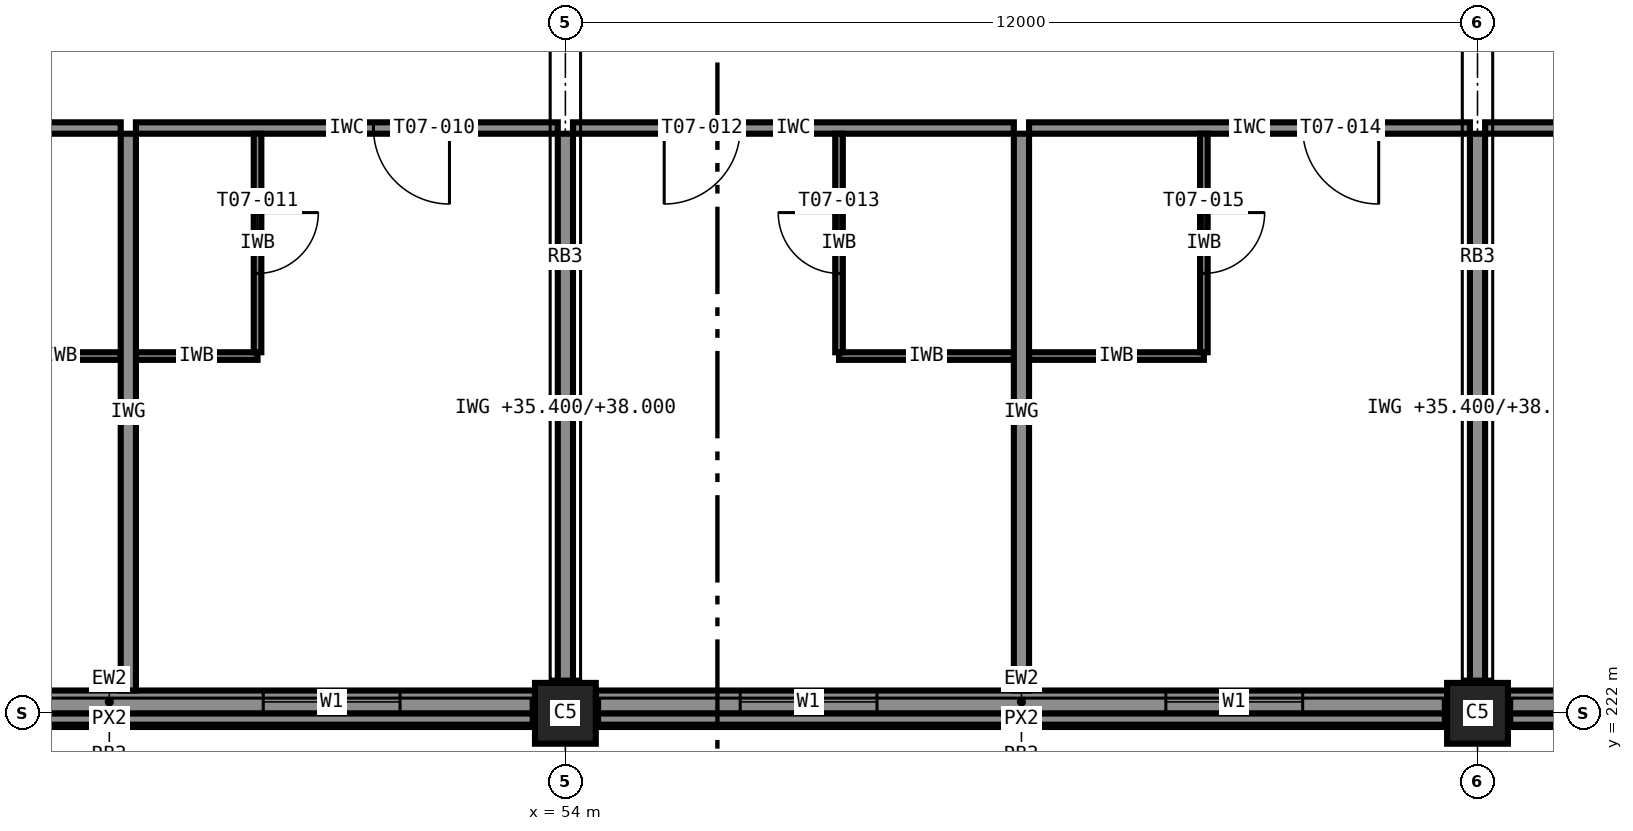
"""IFC4 building model, lengths in metres.
Left out: names, types, materials, properties, quantities, classifications, styles, units other than length and angle.
Written with IfcOpenShell. Run it as: python <this file> out.ifc"""

import sys

from ifc_helpers import new_model, si_unit, direction, frame, frame_2d, origin, origin_2d, place, context, subcontext, project, spatial, rectangle, extrude, element, fill, save


model = new_model("IFC4")
c1 = context("Model", 3, precision=1e-05, world=origin(), true_north=direction((0.0, 1.0)))
c2 = subcontext(c1, "Body", "Model", "MODEL_VIEW")
j1 = project(units=[si_unit("LENGTHUNIT", "METRE"), si_unit("PLANEANGLEUNIT", "RADIAN")], contexts=[c1])
p1 = place(None, origin())
s1 = spatial("IfcSite", under=j1, at=p1, CompositionType="ELEMENT")
p2 = place(p1, origin())
s2 = spatial("IfcBuilding", under=s1, at=p2, CompositionType="ELEMENT")
p3 = place(p2, frame((0.0, 0.0, 35.4)))
s3 = spatial("IfcBuildingStorey", under=s2, at=p3, CompositionType="ELEMENT", Elevation=35.4)
for number, where, z_axis, x_axis in (
    (1, (54.0, 222.0, 0.0), (0.0, 0.0, 1.0), (1.0, 0.0, 0.0)),
    (2, (66.0, 222.0, 0.0), (0.0, 0.0, 1.0), (1.0, 0.0, 0.0)),
):
    element("IfcColumn", number, at=place(p3, frame(where, z_axis=z_axis, x_axis=x_axis)), inside=s3, PredefinedType="COLUMN", context=c2, shape_type="SweptSolid", body=[
        extrude(rectangle(XDim=0.8, YDim=0.8, at=origin_2d()), origin(), (0.0, 0.0, 1.0), 3.6),
    ])
p4 = place(p3, frame((42.4, 222.15, 0.0), z_axis=(0.0, 0.0, 1.0), x_axis=(1.0, 0.0, 0.0)))
e3 = element("IfcWall", 3, at=p4, inside=s3, PredefinedType="STANDARD", context=c2, shape_type="SweptSolid", body=[
    extrude(rectangle(XDim=11.2, YDim=0.3, at=frame_2d((5.6, 0.0))), origin(), (0.0, 0.0, 1.0), 2.6),
])
p5 = place(p4, frame((2.075, 0.0, 0.85)))
e4 = element("IfcOpeningElement", 4, at=p5, cuts=e3, PredefinedType="OPENING", context=c2, shape_type="SweptSolid", body=[
    extrude(rectangle(XDim=1.8, YDim=1.75, at=frame_2d((0.9, 0.875))), frame((0.0, 0.16, 0.0), z_axis=(0.0, -1.0, 0.0), x_axis=(1.0, 0.0, 0.0)), (0.0, 0.0, 1.0), 0.32),
])
p6 = place(p4, frame((7.625, 0.0, 0.85)))
e5 = element("IfcOpeningElement", 5, at=p6, cuts=e3, PredefinedType="OPENING", context=c2, shape_type="SweptSolid", body=[
    extrude(rectangle(XDim=1.8, YDim=1.75, at=frame_2d((0.9, 0.875))), frame((0.0, 0.16, 0.0), z_axis=(0.0, -1.0, 0.0), x_axis=(1.0, 0.0, 0.0)), (0.0, 0.0, 1.0), 0.32),
])
p7 = place(p3, frame((54.4, 222.15, 0.0), z_axis=(0.0, 0.0, 1.0), x_axis=(1.0, 0.0, 0.0)))
e6 = element("IfcWall", 6, at=p7, inside=s3, PredefinedType="STANDARD", context=c2, shape_type="SweptSolid", body=[
    extrude(rectangle(XDim=11.2, YDim=0.3, at=frame_2d((5.6, 0.0))), origin(), (0.0, 0.0, 1.0), 2.6),
])
p8 = place(p7, frame((1.9, 0.0, 0.85)))
e7 = element("IfcOpeningElement", 7, at=p8, cuts=e6, PredefinedType="OPENING", context=c2, shape_type="SweptSolid", body=[
    extrude(rectangle(XDim=1.8, YDim=1.75, at=frame_2d((0.9, 0.875))), frame((0.0, 0.16, 0.0), z_axis=(0.0, -1.0, 0.0), x_axis=(1.0, 0.0, 0.0)), (0.0, 0.0, 1.0), 0.32),
])
p9 = place(p7, frame((7.5, 0.0, 0.85)))
e8 = element("IfcOpeningElement", 8, at=p9, cuts=e6, PredefinedType="OPENING", context=c2, shape_type="SweptSolid", body=[
    extrude(rectangle(XDim=1.8, YDim=1.75, at=frame_2d((0.9, 0.875))), frame((0.0, 0.16, 0.0), z_axis=(0.0, -1.0, 0.0), x_axis=(1.0, 0.0, 0.0)), (0.0, 0.0, 1.0), 0.32),
])
p10 = place(p3, frame((66.4, 222.15, 0.0), z_axis=(0.0, 0.0, 1.0), x_axis=(1.0, 0.0, 0.0)))
e9 = element("IfcWall", 9, at=p10, inside=s3, PredefinedType="STANDARD", context=c2, shape_type="SweptSolid", body=[
    extrude(rectangle(XDim=11.2, YDim=0.3, at=frame_2d((5.6, 0.0))), origin(), (0.0, 0.0, 1.0), 2.6),
])
p11 = place(p10, frame((0.967, 0.0, 0.85)))
e10 = element("IfcOpeningElement", 10, at=p11, cuts=e9, PredefinedType="OPENING", context=c2, shape_type="SweptSolid", body=[
    extrude(rectangle(XDim=1.8, YDim=1.75, at=frame_2d((0.9, 0.875))), frame((0.0, 0.16, 0.0), z_axis=(0.0, -1.0, 0.0), x_axis=(1.0, 0.0, 0.0)), (0.0, 0.0, 1.0), 0.32),
])
p12 = place(p10, frame((4.7, 0.0, 0.85)))
e11 = element("IfcOpeningElement", 11, at=p12, cuts=e9, PredefinedType="OPENING", context=c2, shape_type="SweptSolid", body=[
    extrude(rectangle(XDim=1.8, YDim=1.75, at=frame_2d((0.9, 0.875))), frame((0.0, 0.16, 0.0), z_axis=(0.0, -1.0, 0.0), x_axis=(1.0, 0.0, 0.0)), (0.0, 0.0, 1.0), 0.32),
])
p13 = place(p10, frame((8.433, 0.0, 0.85)))
e12 = element("IfcOpeningElement", 12, at=p13, cuts=e9, PredefinedType="OPENING", context=c2, shape_type="SweptSolid", body=[
    extrude(rectangle(XDim=1.8, YDim=1.75, at=frame_2d((0.9, 0.875))), frame((0.0, 0.16, 0.0), z_axis=(0.0, -1.0, 0.0), x_axis=(1.0, 0.0, 0.0)), (0.0, 0.0, 1.0), 0.32),
])
for number, where, z_axis, x_axis in (
    (13, (42.4, 221.925, 3.4), (0.0, 0.0, 1.0), (1.0, 0.0, 0.0)),
    (14, (54.4, 221.925, 3.4), (0.0, 0.0, 1.0), (1.0, 0.0, 0.0)),
    (15, (66.4, 221.925, 3.4), (0.0, 0.0, 1.0), (1.0, 0.0, 0.0)),
):
    element("IfcWall", number, at=place(p3, frame(where, z_axis=z_axis, x_axis=x_axis)), inside=s3, PredefinedType="STANDARD", context=c2, shape_type="SweptSolid", body=[
        extrude(rectangle(XDim=11.2, YDim=0.15, at=frame_2d((5.6, 0.0))), origin(), (0.0, 0.0, 1.0), 0.2),
    ])
p14 = place(p3, frame((48.15, 229.7, 0.0), z_axis=(0.0, 0.0, 1.0), x_axis=(-1.0, 0.0, 0.0)))
e16 = element("IfcWall", 16, at=p14, inside=s3, PredefinedType="PARTITIONING", context=c2, shape_type="SweptSolid", body=[
    extrude(rectangle(XDim=5.95, YDim=0.15, at=frame_2d((2.975, 0.0))), origin(), (0.0, 0.0, 1.0), 3.4),
])
p15 = place(p14, frame((3.125, 0.0, 0.0)))
e17 = element("IfcOpeningElement", 17, at=p15, cuts=e16, PredefinedType="OPENING", context=c2, shape_type="SweptSolid", body=[
    extrude(rectangle(XDim=1.0, YDim=2.1, at=frame_2d((0.5, 1.05))), frame((0.0, 0.085, 0.0), z_axis=(0.0, -1.0, 0.0), x_axis=(1.0, 0.0, 0.0)), (0.0, 0.0, 1.0), 0.17),
])
p16 = place(p3, frame((46.55, 226.7, 0.0), z_axis=(0.0, 0.0, 1.0), x_axis=(1.0, 0.0, 0.0)))
e18 = element("IfcWall", 18, at=p16, inside=s3, PredefinedType="PARTITIONING", context=c2, shape_type="SweptSolid", body=[
    extrude(rectangle(XDim=1.6, YDim=0.1, at=frame_2d((0.8, 0.0))), origin(), (0.0, 0.0, 1.0), 3.4),
])
p17 = place(p3, frame((53.9, 229.7, 0.0), z_axis=(0.0, 0.0, 1.0), x_axis=(-1.0, 0.0, 0.0)))
e19 = element("IfcWall", 19, at=p17, inside=s3, PredefinedType="PARTITIONING", context=c2, shape_type="SweptSolid", body=[
    extrude(rectangle(XDim=5.55, YDim=0.15, at=frame_2d((2.775, 0.0))), origin(), (0.0, 0.0, 1.0), 3.4),
])
p18 = place(p17, frame((1.425, 0.0, 0.0)))
e20 = element("IfcOpeningElement", 20, at=p18, cuts=e19, PredefinedType="OPENING", context=c2, shape_type="SweptSolid", body=[
    extrude(rectangle(XDim=1.0, YDim=2.1, at=frame_2d((0.5, 1.05))), frame((0.0, 0.085, 0.0), z_axis=(0.0, -1.0, 0.0), x_axis=(1.0, 0.0, 0.0)), (0.0, 0.0, 1.0), 0.17),
])
p19 = place(p3, frame((48.35, 226.7, 0.0), z_axis=(0.0, 0.0, 1.0), x_axis=(1.0, 0.0, 0.0)))
e21 = element("IfcWall", 21, at=p19, inside=s3, PredefinedType="PARTITIONING", context=c2, shape_type="SweptSolid", body=[
    extrude(rectangle(XDim=1.6, YDim=0.1, at=frame_2d((0.8, 0.0))), origin(), (0.0, 0.0, 1.0), 3.4),
])
p20 = place(p3, frame((49.95, 229.625, 0.0), z_axis=(0.0, 0.0, 1.0), x_axis=(0.0, -1.0, 0.0)))
e22 = element("IfcWall", 22, at=p20, inside=s3, PredefinedType="PARTITIONING", context=c2, shape_type="SweptSolid", body=[
    extrude(rectangle(XDim=2.875, YDim=0.1, at=frame_2d((1.438, 0.0))), origin(), (0.0, 0.0, 1.0), 3.4),
])
p21 = place(p20, frame((1.038, 0.0, 0.0)))
e23 = element("IfcOpeningElement", 23, at=p21, cuts=e22, PredefinedType="OPENING", context=c2, shape_type="SweptSolid", body=[
    extrude(rectangle(XDim=0.8, YDim=2.1, at=frame_2d((0.4, 1.05))), frame((0.0, 0.06, 0.0), z_axis=(0.0, -1.0, 0.0), x_axis=(1.0, 0.0, 0.0)), (0.0, 0.0, 1.0), 0.12),
])
p22 = place(p3, frame((59.9, 229.7, 0.0), z_axis=(0.0, 0.0, 1.0), x_axis=(-1.0, 0.0, 0.0)))
e24 = element("IfcWall", 24, at=p22, inside=s3, PredefinedType="PARTITIONING", context=c2, shape_type="SweptSolid", body=[
    extrude(rectangle(XDim=5.8, YDim=0.15, at=frame_2d((2.9, 0.0))), origin(), (0.0, 0.0, 1.0), 3.4),
])
p23 = place(p22, frame((3.6, 0.0, 0.0)))
e25 = element("IfcOpeningElement", 25, at=p23, cuts=e24, PredefinedType="OPENING", context=c2, shape_type="SweptSolid", body=[
    extrude(rectangle(XDim=1.0, YDim=2.1, at=frame_2d((0.5, 1.05))), frame((0.0, 0.085, 0.0), z_axis=(0.0, -1.0, 0.0), x_axis=(1.0, 0.0, 0.0)), (0.0, 0.0, 1.0), 0.17),
])
p24 = place(p3, frame((57.6, 226.7, 0.0), z_axis=(0.0, 0.0, 1.0), x_axis=(1.0, 0.0, 0.0)))
e26 = element("IfcWall", 26, at=p24, inside=s3, PredefinedType="PARTITIONING", context=c2, shape_type="SweptSolid", body=[
    extrude(rectangle(XDim=2.3, YDim=0.1, at=frame_2d((1.15, 0.0))), origin(), (0.0, 0.0, 1.0), 3.4),
])
p25 = place(p3, frame((57.6, 226.75, 0.0), z_axis=(0.0, 0.0, 1.0), x_axis=(0.0, 1.0, 0.0)))
e27 = element("IfcWall", 27, at=p25, inside=s3, PredefinedType="PARTITIONING", context=c2, shape_type="SweptSolid", body=[
    extrude(rectangle(XDim=2.875, YDim=0.1, at=frame_2d((1.438, 0.0))), origin(), (0.0, 0.0, 1.0), 3.4),
])
p26 = place(p25, frame((1.038, 0.0, 0.0)))
e28 = element("IfcOpeningElement", 28, at=p26, cuts=e27, PredefinedType="OPENING", context=c2, shape_type="SweptSolid", body=[
    extrude(rectangle(XDim=0.8, YDim=2.1, at=frame_2d((0.4, 1.05))), frame((0.0, 0.06, 0.0), z_axis=(0.0, -1.0, 0.0), x_axis=(1.0, 0.0, 0.0)), (0.0, 0.0, 1.0), 0.12),
])
p27 = place(p3, frame((65.9, 229.7, 0.0), z_axis=(0.0, 0.0, 1.0), x_axis=(-1.0, 0.0, 0.0)))
e29 = element("IfcWall", 29, at=p27, inside=s3, PredefinedType="PARTITIONING", context=c2, shape_type="SweptSolid", body=[
    extrude(rectangle(XDim=5.8, YDim=0.15, at=frame_2d((2.9, 0.0))), origin(), (0.0, 0.0, 1.0), 3.4),
])
p28 = place(p27, frame((1.2, 0.0, 0.0)))
e30 = element("IfcOpeningElement", 30, at=p28, cuts=e29, PredefinedType="OPENING", context=c2, shape_type="SweptSolid", body=[
    extrude(rectangle(XDim=1.0, YDim=2.1, at=frame_2d((0.5, 1.05))), frame((0.0, 0.085, 0.0), z_axis=(0.0, -1.0, 0.0), x_axis=(1.0, 0.0, 0.0)), (0.0, 0.0, 1.0), 0.17),
])
p29 = place(p3, frame((60.1, 226.7, 0.0), z_axis=(0.0, 0.0, 1.0), x_axis=(1.0, 0.0, 0.0)))
e31 = element("IfcWall", 31, at=p29, inside=s3, PredefinedType="PARTITIONING", context=c2, shape_type="SweptSolid", body=[
    extrude(rectangle(XDim=2.3, YDim=0.1, at=frame_2d((1.15, 0.0))), origin(), (0.0, 0.0, 1.0), 3.4),
])
p30 = place(p3, frame((62.4, 229.625, 0.0), z_axis=(0.0, 0.0, 1.0), x_axis=(0.0, -1.0, 0.0)))
e32 = element("IfcWall", 32, at=p30, inside=s3, PredefinedType="PARTITIONING", context=c2, shape_type="SweptSolid", body=[
    extrude(rectangle(XDim=2.875, YDim=0.1, at=frame_2d((1.438, 0.0))), origin(), (0.0, 0.0, 1.0), 3.4),
])
p31 = place(p30, frame((1.038, 0.0, 0.0)))
e33 = element("IfcOpeningElement", 33, at=p31, cuts=e32, PredefinedType="OPENING", context=c2, shape_type="SweptSolid", body=[
    extrude(rectangle(XDim=0.8, YDim=2.1, at=frame_2d((0.4, 1.05))), frame((0.0, 0.06, 0.0), z_axis=(0.0, -1.0, 0.0), x_axis=(1.0, 0.0, 0.0)), (0.0, 0.0, 1.0), 0.12),
])
p32 = place(p3, frame((77.9, 229.7, 0.0), z_axis=(0.0, 0.0, 1.0), x_axis=(-1.0, 0.0, 0.0)))
e34 = element("IfcWall", 34, at=p32, inside=s3, PredefinedType="PARTITIONING", context=c2, shape_type="SweptSolid", body=[
    extrude(rectangle(XDim=11.8, YDim=0.15, at=frame_2d((5.9, 0.0))), origin(), (0.0, 0.0, 1.0), 3.4),
])
p33 = place(p32, frame((5.0, 0.0, 0.0)))
e35 = element("IfcOpeningElement", 35, at=p33, cuts=e34, PredefinedType="OPENING", context=c2, shape_type="SweptSolid", body=[
    extrude(rectangle(XDim=1.8, YDim=2.1, at=frame_2d((0.9, 1.05))), frame((0.0, 0.085, 0.0), z_axis=(0.0, -1.0, 0.0), x_axis=(1.0, 0.0, 0.0)), (0.0, 0.0, 1.0), 0.17),
])
p34 = place(p3, frame((48.25, 222.3, 0.0), z_axis=(0.0, 0.0, 1.0), x_axis=(0.0, 1.0, 0.0)))
e36 = element("IfcWall", 36, at=p34, inside=s3, PredefinedType="PARTITIONING", context=c2, shape_type="SweptSolid", body=[
    extrude(rectangle(XDim=7.325, YDim=0.2, at=frame_2d((3.663, 0.0))), origin(), (0.0, 0.0, 1.0), 3.4),
])
p35 = place(p3, frame((54.0, 222.4, 0.0), z_axis=(0.0, 0.0, 1.0), x_axis=(0.0, 1.0, 0.0)))
e37 = element("IfcWall", 37, at=p35, inside=s3, PredefinedType="PARTITIONING", context=c2, shape_type="SweptSolid", body=[
    extrude(rectangle(XDim=7.225, YDim=0.2, at=frame_2d((3.613, 0.0))), origin(), (0.0, 0.0, 1.0), 2.6),
])
p36 = place(p3, frame((60.0, 222.3, 0.0), z_axis=(0.0, 0.0, 1.0), x_axis=(0.0, 1.0, 0.0)))
e38 = element("IfcWall", 38, at=p36, inside=s3, PredefinedType="PARTITIONING", context=c2, shape_type="SweptSolid", body=[
    extrude(rectangle(XDim=7.325, YDim=0.2, at=frame_2d((3.663, 0.0))), origin(), (0.0, 0.0, 1.0), 3.4),
])
p37 = place(p3, frame((66.0, 222.4, 0.0), z_axis=(0.0, 0.0, 1.0), x_axis=(0.0, 1.0, 0.0)))
e39 = element("IfcWall", 39, at=p37, inside=s3, PredefinedType="PARTITIONING", context=c2, shape_type="SweptSolid", body=[
    extrude(rectangle(XDim=7.225, YDim=0.2, at=frame_2d((3.613, 0.0))), origin(), (0.0, 0.0, 1.0), 2.6),
])
p38 = place(p6, origin())
e40 = element("IfcWindow", 40, at=p38, inside=s3, PartitioningType="SINGLE_PANEL", PredefinedType="WINDOW", context=c2, shape_type="SweptSolid", body=[
    extrude(rectangle(XDim=1.8, YDim=1.75, at=frame_2d((0.9, 0.875))), frame((0.0, 0.03, 0.0), z_axis=(0.0, -1.0, 0.0), x_axis=(1.0, 0.0, 0.0)), (0.0, 0.0, 1.0), 0.06),
])
fill(e5, e40)
p39 = place(p8, origin())
e41 = element("IfcWindow", 41, at=p39, inside=s3, PartitioningType="SINGLE_PANEL", PredefinedType="WINDOW", context=c2, shape_type="SweptSolid", body=[
    extrude(rectangle(XDim=1.8, YDim=1.75, at=frame_2d((0.9, 0.875))), frame((0.0, 0.03, 0.0), z_axis=(0.0, -1.0, 0.0), x_axis=(1.0, 0.0, 0.0)), (0.0, 0.0, 1.0), 0.06),
])
fill(e7, e41)
p40 = place(p9, origin())
e42 = element("IfcWindow", 42, at=p40, inside=s3, PartitioningType="SINGLE_PANEL", PredefinedType="WINDOW", context=c2, shape_type="SweptSolid", body=[
    extrude(rectangle(XDim=1.8, YDim=1.75, at=frame_2d((0.9, 0.875))), frame((0.0, 0.03, 0.0), z_axis=(0.0, -1.0, 0.0), x_axis=(1.0, 0.0, 0.0)), (0.0, 0.0, 1.0), 0.06),
])
fill(e8, e42)
p41 = place(p18, origin())
e43 = element("IfcDoor", 43, at=p41, inside=s3, OperationType="SINGLE_SWING_LEFT", PredefinedType="DOOR", context=c2, shape_type="SweptSolid", body=[
    extrude(rectangle(XDim=1.0, YDim=2.1, at=frame_2d((0.5, 1.05))), frame((0.0, 0.025, 0.0), z_axis=(0.0, -1.0, 0.0), x_axis=(1.0, 0.0, 0.0)), (0.0, 0.0, 1.0), 0.05),
])
fill(e20, e43)
p42 = place(p21, origin())
e44 = element("IfcDoor", 44, at=p42, inside=s3, OperationType="SINGLE_SWING_LEFT", PredefinedType="DOOR", context=c2, shape_type="SweptSolid", body=[
    extrude(rectangle(XDim=0.8, YDim=2.1, at=frame_2d((0.4, 1.05))), frame((0.0, 0.025, 0.0), z_axis=(0.0, -1.0, 0.0), x_axis=(1.0, 0.0, 0.0)), (0.0, 0.0, 1.0), 0.05),
])
fill(e23, e44)
p43 = place(p23, origin())
e45 = element("IfcDoor", 45, at=p43, inside=s3, OperationType="SINGLE_SWING_RIGHT", PredefinedType="DOOR", context=c2, shape_type="SweptSolid", body=[
    extrude(rectangle(XDim=1.0, YDim=2.1, at=frame_2d((0.5, 1.05))), frame((0.0, 0.025, 0.0), z_axis=(0.0, -1.0, 0.0), x_axis=(1.0, 0.0, 0.0)), (0.0, 0.0, 1.0), 0.05),
])
fill(e25, e45)
p44 = place(p26, origin())
e46 = element("IfcDoor", 46, at=p44, inside=s3, OperationType="SINGLE_SWING_RIGHT", PredefinedType="DOOR", context=c2, shape_type="SweptSolid", body=[
    extrude(rectangle(XDim=0.8, YDim=2.1, at=frame_2d((0.4, 1.05))), frame((0.0, 0.025, 0.0), z_axis=(0.0, -1.0, 0.0), x_axis=(1.0, 0.0, 0.0)), (0.0, 0.0, 1.0), 0.05),
])
fill(e28, e46)
p45 = place(p28, origin())
e47 = element("IfcDoor", 47, at=p45, inside=s3, OperationType="SINGLE_SWING_LEFT", PredefinedType="DOOR", context=c2, shape_type="SweptSolid", body=[
    extrude(rectangle(XDim=1.0, YDim=2.1, at=frame_2d((0.5, 1.05))), frame((0.0, 0.025, 0.0), z_axis=(0.0, -1.0, 0.0), x_axis=(1.0, 0.0, 0.0)), (0.0, 0.0, 1.0), 0.05),
])
fill(e30, e47)
p46 = place(p31, origin())
e48 = element("IfcDoor", 48, at=p46, inside=s3, OperationType="SINGLE_SWING_LEFT", PredefinedType="DOOR", context=c2, shape_type="SweptSolid", body=[
    extrude(rectangle(XDim=0.8, YDim=2.1, at=frame_2d((0.4, 1.05))), frame((0.0, 0.025, 0.0), z_axis=(0.0, -1.0, 0.0), x_axis=(1.0, 0.0, 0.0)), (0.0, 0.0, 1.0), 0.05),
])
fill(e33, e48)
save(model, sys.argv[1])
